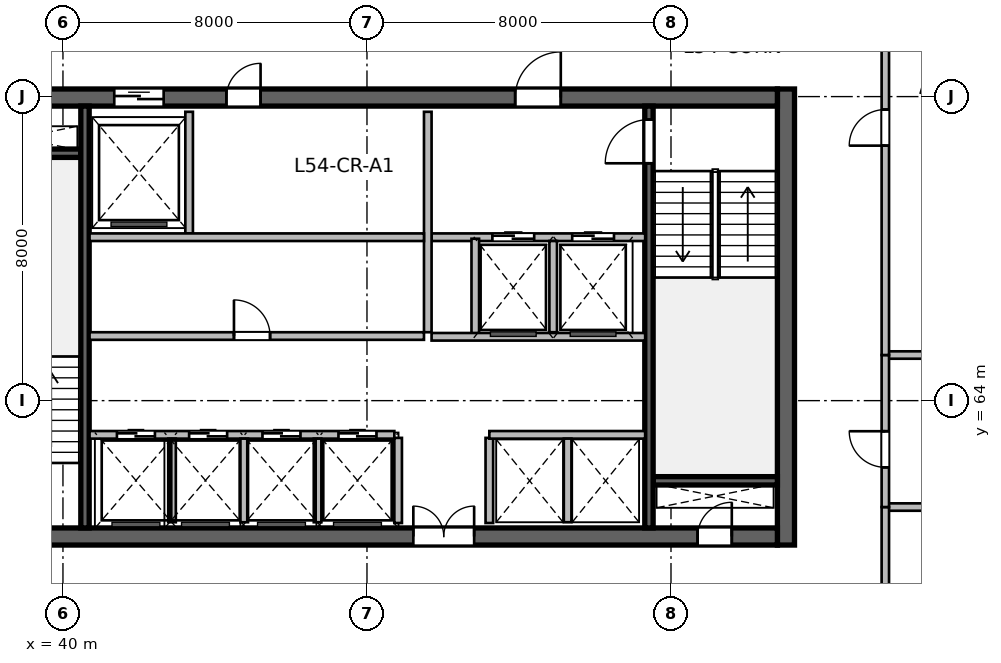
"""IFC4 building model, lengths in metres.
Left out: names, types, materials, properties, quantities, classifications, styles, units other than length and angle.
Written with IfcOpenShell. Run it as: python <this file> out.ifc"""

import sys

from ifc_helpers import new_model, si_unit, direction, frame, frame_2d, origin, place, context, subcontext, project, spatial, rectangle, extrude, source, transform, mapped, element, fill, save


model = new_model("IFC4")
c1 = context("Model", 3, precision=1e-05, world=origin(), true_north=direction((0.0, 1.0)))
c2 = subcontext(c1, "Body", "Model", "MODEL_VIEW")
j1 = project(units=[si_unit("LENGTHUNIT", "METRE"), si_unit("PLANEANGLEUNIT", "RADIAN")], contexts=[c1])
p1 = place(None, origin())
s1 = spatial("IfcSite", under=j1, at=p1, CompositionType="ELEMENT")
p2 = place(p1, origin())
s2 = spatial("IfcBuilding", under=s1, at=p2, CompositionType="ELEMENT")
p3 = place(p2, frame((0.0, 0.0, 223.5)))
s3 = spatial("IfcBuildingStorey", under=s2, at=p3, CompositionType="ELEMENT", Elevation=223.5)
m1 = source(origin(), c2, "Body", "SweptSolid", [
    extrude(rectangle(XDim=12.0, YDim=0.45, at=frame_2d((6.0, 0.0))), origin(), (0.0, 0.0, 1.0), 3.9),
])
p4 = place(p3, frame((59.025, 60.2, 0.0), z_axis=(0.0, 0.0, 1.0), x_axis=(0.0, 1.0, 0.0)))
e1 = element("IfcWall", 1, at=p4, inside=s3, PredefinedType="SHEAR", context=c2, shape_type="MappedRepresentation", body=[
    mapped(m1, transform((0.0, 0.0, 0.0), scale=1.0)),
])
m2 = source(origin(), c2, "Body", "SweptSolid", [
    extrude(rectangle(XDim=21.6, YDim=0.45, at=frame_2d((10.8, 0.0))), origin(), (0.0, 0.0, 1.0), 3.9),
])
p5 = place(p3, frame((37.2, 60.425, 0.0), z_axis=(0.0, 0.0, 1.0), x_axis=(1.0, 0.0, 0.0)))
e2 = element("IfcWall", 2, at=p5, inside=s3, PredefinedType="SHEAR", context=c2, shape_type="MappedRepresentation", body=[
    mapped(m2, transform((0.0, 0.0, 0.0), scale=1.0)),
])
p6 = place(p5, frame((1.1, 0.0, 0.0)))
e3 = element("IfcOpeningElement", 3, at=p6, cuts=e2, PredefinedType="OPENING", context=c2, shape_type="SweptSolid", body=[
    extrude(rectangle(XDim=1.15, YDim=2.15, at=frame_2d((0.575, 1.075))), frame((0.0, 0.235, 0.0), z_axis=(0.0, -1.0, 0.0), x_axis=(1.0, 0.0, 0.0)), (0.0, 0.0, 1.0), 0.47),
])
p7 = place(p5, frame((19.5, 0.0, 0.0)))
e4 = element("IfcOpeningElement", 4, at=p7, cuts=e2, PredefinedType="OPENING", context=c2, shape_type="SweptSolid", body=[
    extrude(rectangle(XDim=0.9, YDim=2.1, at=frame_2d((0.45, 1.05))), frame((0.0, 0.235, 0.0), z_axis=(0.0, -1.0, 0.0), x_axis=(1.0, 0.0, 0.0)), (0.0, 0.0, 1.0), 0.47),
])
p8 = place(p5, frame((12.02, 0.0, 0.0)))
e5 = element("IfcOpeningElement", 5, at=p8, cuts=e2, PredefinedType="OPENING", context=c2, shape_type="SweptSolid", body=[
    extrude(rectangle(XDim=1.6, YDim=2.15, at=frame_2d((0.8, 1.075))), frame((0.0, 0.235, 0.0), z_axis=(0.0, -1.0, 0.0), x_axis=(1.0, 0.0, 0.0)), (0.0, 0.0, 1.0), 0.47),
])
p9 = place(p3, frame((37.2, 71.975, 0.0), z_axis=(0.0, 0.0, 1.0), x_axis=(1.0, 0.0, 0.0)))
e6 = element("IfcWall", 6, at=p9, inside=s3, PredefinedType="SHEAR", context=c2, shape_type="MappedRepresentation", body=[
    mapped(m2, transform((0.0, 0.0, 0.0), scale=1.0)),
])
p10 = place(p9, frame((1.2, 0.0, 0.0)))
e7 = element("IfcOpeningElement", 7, at=p10, cuts=e6, PredefinedType="OPENING", context=c2, shape_type="SweptSolid", body=[
    extrude(rectangle(XDim=0.9, YDim=2.1, at=frame_2d((0.45, 1.05))), frame((0.0, 0.235, 0.0), z_axis=(0.0, -1.0, 0.0), x_axis=(1.0, 0.0, 0.0)), (0.0, 0.0, 1.0), 0.47),
])
p11 = place(p9, frame((14.7, 0.0, 0.0)))
e8 = element("IfcOpeningElement", 8, at=p11, cuts=e6, PredefinedType="OPENING", context=c2, shape_type="SweptSolid", body=[
    extrude(rectangle(XDim=1.2, YDim=2.15, at=frame_2d((0.6, 1.075))), frame((0.0, 0.235, 0.0), z_axis=(0.0, -1.0, 0.0), x_axis=(1.0, 0.0, 0.0)), (0.0, 0.0, 1.0), 0.47),
])
p12 = place(p9, frame((4.15, 0.0, 0.0)))
e9 = element("IfcOpeningElement", 9, at=p12, cuts=e6, PredefinedType="OPENING", context=c2, shape_type="SweptSolid", body=[
    extrude(rectangle(XDim=1.3, YDim=2.15, at=frame_2d((0.65, 1.075))), frame((0.0, 0.235, 0.0), z_axis=(0.0, -1.0, 0.0), x_axis=(1.0, 0.0, 0.0)), (0.0, 0.0, 1.0), 0.47),
])
p13 = place(p9, frame((7.1, 0.0, 0.0)))
e10 = element("IfcOpeningElement", 10, at=p13, cuts=e6, PredefinedType="OPENING", context=c2, shape_type="SweptSolid", body=[
    extrude(rectangle(XDim=0.9, YDim=2.1, at=frame_2d((0.45, 1.05))), frame((0.0, 0.235, 0.0), z_axis=(0.0, -1.0, 0.0), x_axis=(1.0, 0.0, 0.0)), (0.0, 0.0, 1.0), 0.47),
])
m3 = source(origin(), c2, "Body", "SweptSolid", [
    extrude(rectangle(XDim=3.27, YDim=0.22, at=frame_2d((1.635, 0.0))), origin(), (0.0, 0.0, 1.0), 3.9),
])
for number, where, z_axis, x_axis in (
    (11, (37.2, 70.51, 0.0), (0.0, 0.0, 1.0), (1.0, 0.0, 0.0)),
    (12, (55.53, 61.89, 0.0), (0.0, 0.0, 1.0), (1.0, 0.0, 0.0)),
):
    element("IfcWall", number, at=place(p3, frame(where, z_axis=z_axis, x_axis=x_axis)), inside=s3, PredefinedType="SHEAR", context=c2, shape_type="MappedRepresentation", body=[
        mapped(m3, transform((0.0, 0.0, 0.0), scale=1.0)),
    ])
m4 = source(origin(), c2, "Body", "SweptSolid", [
    extrude(rectangle(XDim=11.1, YDim=0.22, at=frame_2d((5.55, 0.0))), origin(), (0.0, 0.0, 1.0), 3.9),
])
p14 = place(p3, frame((40.58, 60.65, 0.0), z_axis=(0.0, 0.0, 1.0), x_axis=(0.0, 1.0, 0.0)))
e13 = element("IfcWall", 13, at=p14, inside=s3, PredefinedType="SHEAR", context=c2, shape_type="MappedRepresentation", body=[
    mapped(m4, transform((0.0, 0.0, 0.0), scale=1.0)),
])
p15 = place(p3, frame((55.42, 60.65, 0.0), z_axis=(0.0, 0.0, 1.0), x_axis=(0.0, 1.0, 0.0)))
e14 = element("IfcWall", 14, at=p15, inside=s3, PredefinedType="SHEAR", context=c2, shape_type="MappedRepresentation", body=[
    mapped(m4, transform((0.0, 0.0, 0.0), scale=1.0)),
])
p16 = place(p15, frame((9.595, 0.0, 0.0)))
e15 = element("IfcOpeningElement", 15, at=p16, cuts=e14, PredefinedType="OPENING", context=c2, shape_type="SweptSolid", body=[
    extrude(rectangle(XDim=1.15, YDim=2.15, at=frame_2d((0.575, 1.075))), frame((0.0, 0.12, 0.0), z_axis=(0.0, -1.0, 0.0), x_axis=(1.0, 0.0, 0.0)), (0.0, 0.0, 1.0), 0.24),
])
m5 = source(origin(), c2, "Body", "SweptSolid", [
    extrude(rectangle(XDim=2.24, YDim=0.2, at=frame_2d((1.12, 0.0))), origin(), (0.0, 0.0, 1.0), 3.64),
])
for number, where, z_axis, x_axis in (
    (16, (48.82, 60.78, 0.0), (0.0, 0.0, 1.0), (0.0, 1.0, 0.0)),
    (17, (51.22, 60.78, 0.0), (0.0, 0.0, 1.0), (0.0, 1.0, 0.0)),
):
    element("IfcWall", number, at=place(p3, frame(where, z_axis=z_axis, x_axis=x_axis)), inside=s3, PredefinedType="SOLIDWALL", context=c2, shape_type="MappedRepresentation", body=[
        mapped(m5, transform((0.0, 0.0, 0.0), scale=1.0)),
    ])
m6 = source(origin(), c2, "Body", "SweptSolid", [
    extrude(rectangle(XDim=5.62, YDim=0.2, at=frame_2d((2.81, 0.0))), origin(), (0.0, 0.0, 1.0), 3.64),
])
p17 = place(p3, frame((49.7, 68.3, 0.0), z_axis=(0.0, 0.0, 1.0), x_axis=(1.0, 0.0, 0.0)))
e18 = element("IfcWall", 18, at=p17, inside=s3, PredefinedType="SOLIDWALL", context=c2, shape_type="MappedRepresentation", body=[
    mapped(m6, transform((0.0, 0.0, 0.0), scale=1.0)),
])
p18 = place(p17, frame((1.6, 0.0, 0.0)))
e19 = element("IfcOpeningElement", 19, at=p18, cuts=e18, PredefinedType="OPENING", context=c2, shape_type="SweptSolid", body=[
    extrude(rectangle(XDim=1.1, YDim=2.15, at=frame_2d((0.55, 1.075))), frame((0.0, 0.11, 0.0), z_axis=(0.0, -1.0, 0.0), x_axis=(1.0, 0.0, 0.0)), (0.0, 0.0, 1.0), 0.22),
])
p19 = place(p17, frame((3.7, 0.0, 0.0)))
e20 = element("IfcOpeningElement", 20, at=p19, cuts=e18, PredefinedType="OPENING", context=c2, shape_type="SweptSolid", body=[
    extrude(rectangle(XDim=1.1, YDim=2.15, at=frame_2d((0.55, 1.075))), frame((0.0, 0.11, 0.0), z_axis=(0.0, -1.0, 0.0), x_axis=(1.0, 0.0, 0.0)), (0.0, 0.0, 1.0), 0.22),
])
m7 = source(origin(), c2, "Body", "SweptSolid", [
    extrude(rectangle(XDim=5.8, YDim=0.2, at=frame_2d((2.9, 0.0))), origin(), (0.0, 0.0, 1.0), 3.64),
])
p20 = place(p3, frame((49.6, 65.8, 0.0), z_axis=(0.0, 0.0, 1.0), x_axis=(0.0, 1.0, 0.0)))
e21 = element("IfcWall", 21, at=p20, inside=s3, PredefinedType="SOLIDWALL", context=c2, shape_type="MappedRepresentation", body=[
    mapped(m7, transform((0.0, 0.0, 0.0), scale=1.0)),
])
m8 = source(origin(), c2, "Body", "SweptSolid", [
    extrude(rectangle(XDim=2.58, YDim=0.2, at=frame_2d((1.29, 0.0))), origin(), (0.0, 0.0, 1.0), 3.64),
])
p21 = place(p3, frame((50.85, 65.68, 0.0), z_axis=(0.0, 0.0, 1.0), x_axis=(0.0, 1.0, 0.0)))
e22 = element("IfcWall", 22, at=p21, inside=s3, PredefinedType="SOLIDWALL", context=c2, shape_type="MappedRepresentation", body=[
    mapped(m8, transform((0.0, 0.0, 0.0), scale=1.0)),
])
m9 = source(origin(), c2, "Body", "SweptSolid", [
    extrude(rectangle(XDim=2.4, YDim=0.2, at=frame_2d((1.2, 0.0))), origin(), (0.0, 0.0, 1.0), 3.64),
])
p22 = place(p3, frame((52.9, 65.8, 0.0), z_axis=(0.0, 0.0, 1.0), x_axis=(0.0, 1.0, 0.0)))
e23 = element("IfcWall", 23, at=p22, inside=s3, PredefinedType="SOLIDWALL", context=c2, shape_type="MappedRepresentation", body=[
    mapped(m9, transform((0.0, 0.0, 0.0), scale=1.0)),
])
p23 = place(p3, frame((49.7, 65.68, 0.0), z_axis=(0.0, 0.0, 1.0), x_axis=(1.0, 0.0, 0.0)))
e24 = element("IfcWall", 24, at=p23, inside=s3, PredefinedType="SOLIDWALL", context=c2, shape_type="MappedRepresentation", body=[
    mapped(m6, transform((0.0, 0.0, 0.0), scale=1.0)),
])
m10 = source(origin(), c2, "Body", "SweptSolid", [
    extrude(rectangle(XDim=3.2, YDim=0.2, at=frame_2d((1.6, 0.0))), origin(), (0.0, 0.0, 1.0), 3.64),
])
p24 = place(p3, frame((43.32, 68.4, 0.0), z_axis=(0.0, 0.0, 1.0), x_axis=(0.0, 1.0, 0.0)))
e25 = element("IfcWall", 25, at=p24, inside=s3, PredefinedType="SOLIDWALL", context=c2, shape_type="MappedRepresentation", body=[
    mapped(m10, transform((0.0, 0.0, 0.0), scale=1.0)),
])
m11 = source(origin(), c2, "Body", "SweptSolid", [
    extrude(rectangle(XDim=8.8, YDim=0.2, at=frame_2d((4.4, 0.0))), origin(), (0.0, 0.0, 1.0), 3.64),
])
p25 = place(p3, frame((40.7, 68.3, 0.0), z_axis=(0.0, 0.0, 1.0), x_axis=(1.0, 0.0, 0.0)))
e26 = element("IfcWall", 26, at=p25, inside=s3, PredefinedType="SOLIDWALL", context=c2, shape_type="MappedRepresentation", body=[
    mapped(m11, transform((0.0, 0.0, 0.0), scale=1.0)),
])
m12 = source(origin(), c2, "Body", "SweptSolid", [
    extrude(rectangle(XDim=8.02, YDim=0.2, at=frame_2d((4.01, 0.0))), origin(), (0.0, 0.0, 1.0), 3.64),
])
p26 = place(p3, frame((40.7, 63.1, 0.0), z_axis=(0.0, 0.0, 1.0), x_axis=(1.0, 0.0, 0.0)))
e27 = element("IfcWall", 27, at=p26, inside=s3, PredefinedType="SOLIDWALL", context=c2, shape_type="MappedRepresentation", body=[
    mapped(m12, transform((0.0, 0.0, 0.0), scale=1.0)),
])
p27 = place(p26, frame((0.72, 0.0, 0.0)))
e28 = element("IfcOpeningElement", 28, at=p27, cuts=e27, PredefinedType="OPENING", context=c2, shape_type="SweptSolid", body=[
    extrude(rectangle(XDim=1.0, YDim=2.15, at=frame_2d((0.5, 1.075))), frame((0.0, 0.11, 0.0), z_axis=(0.0, -1.0, 0.0), x_axis=(1.0, 0.0, 0.0)), (0.0, 0.0, 1.0), 0.22),
])
p28 = place(p26, frame((2.62, 0.0, 0.0)))
e29 = element("IfcOpeningElement", 29, at=p28, cuts=e27, PredefinedType="OPENING", context=c2, shape_type="SweptSolid", body=[
    extrude(rectangle(XDim=1.0, YDim=2.15, at=frame_2d((0.5, 1.075))), frame((0.0, 0.11, 0.0), z_axis=(0.0, -1.0, 0.0), x_axis=(1.0, 0.0, 0.0)), (0.0, 0.0, 1.0), 0.22),
])
p29 = place(p26, frame((4.55, 0.0, 0.0)))
e30 = element("IfcOpeningElement", 30, at=p29, cuts=e27, PredefinedType="OPENING", context=c2, shape_type="SweptSolid", body=[
    extrude(rectangle(XDim=1.0, YDim=2.15, at=frame_2d((0.5, 1.075))), frame((0.0, 0.11, 0.0), z_axis=(0.0, -1.0, 0.0), x_axis=(1.0, 0.0, 0.0)), (0.0, 0.0, 1.0), 0.22),
])
p30 = place(p26, frame((6.55, 0.0, 0.0)))
e31 = element("IfcOpeningElement", 31, at=p30, cuts=e27, PredefinedType="OPENING", context=c2, shape_type="SweptSolid", body=[
    extrude(rectangle(XDim=1.0, YDim=2.15, at=frame_2d((0.5, 1.075))), frame((0.0, 0.11, 0.0), z_axis=(0.0, -1.0, 0.0), x_axis=(1.0, 0.0, 0.0)), (0.0, 0.0, 1.0), 0.22),
])
m13 = source(origin(), c2, "Body", "SweptSolid", [
    extrude(rectangle(XDim=4.1, YDim=0.2, at=frame_2d((2.05, 0.0))), origin(), (0.0, 0.0, 1.0), 3.64),
])
p31 = place(p3, frame((51.22, 63.1, 0.0), z_axis=(0.0, 0.0, 1.0), x_axis=(1.0, 0.0, 0.0)))
e32 = element("IfcWall", 32, at=p31, inside=s3, PredefinedType="SOLIDWALL", context=c2, shape_type="MappedRepresentation", body=[
    mapped(m13, transform((0.0, 0.0, 0.0), scale=1.0)),
])
m14 = source(origin(), c2, "Body", "SweptSolid", [
    extrude(rectangle(XDim=2.2, YDim=0.2, at=frame_2d((1.1, 0.0))), origin(), (0.0, 0.0, 1.0), 3.64),
])
for number, where, z_axis, x_axis in (
    (33, (42.87, 60.8, 0.0), (0.0, 0.0, 1.0), (0.0, 1.0, 0.0)),
    (34, (44.77, 60.8, 0.0), (0.0, 0.0, 1.0), (0.0, 1.0, 0.0)),
    (35, (46.7, 60.8, 0.0), (0.0, 0.0, 1.0), (0.0, 1.0, 0.0)),
    (36, (53.28, 60.8, 0.0), (0.0, 0.0, 1.0), (0.0, 1.0, 0.0)),
):
    element("IfcWall", number, at=place(p3, frame(where, z_axis=z_axis, x_axis=x_axis)), inside=s3, PredefinedType="SOLIDWALL", context=c2, shape_type="MappedRepresentation", body=[
        mapped(m14, transform((0.0, 0.0, 0.0), scale=1.0)),
    ])
p32 = place(p3, frame((40.7, 65.7, 0.0), z_axis=(0.0, 0.0, 1.0), x_axis=(1.0, 0.0, 0.0)))
e37 = element("IfcWall", 37, at=p32, inside=s3, PredefinedType="SOLIDWALL", context=c2, shape_type="MappedRepresentation", body=[
    mapped(m11, transform((0.0, 0.0, 0.0), scale=1.0)),
])
p33 = place(p32, frame((3.8, 0.0, 0.0)))
e38 = element("IfcOpeningElement", 38, at=p33, cuts=e37, PredefinedType="OPENING", context=c2, shape_type="SweptSolid", body=[
    extrude(rectangle(XDim=0.95, YDim=2.15, at=frame_2d((0.475, 1.075))), frame((0.0, 0.11, 0.0), z_axis=(0.0, -1.0, 0.0), x_axis=(1.0, 0.0, 0.0)), (0.0, 0.0, 1.0), 0.22),
])
m15 = source(origin(), c2, "Body", "SweptSolid", [
    extrude(rectangle(XDim=18.342, YDim=0.195, at=frame_2d((9.171, 0.0))), origin(), (0.0, 0.0, 1.0), 3.64),
])
p34 = place(p3, frame((61.64, 61.2, 0.0), z_axis=(0.0, 0.0, 1.0), x_axis=(1.0, 0.0, 0.0)))
e39 = element("IfcWall", 39, at=p34, inside=s3, PredefinedType="PARTITIONING", context=c2, shape_type="MappedRepresentation", body=[
    mapped(m15, transform((0.0, 0.0, 0.0), scale=1.0)),
])
m16 = source(origin(), c2, "Body", "SweptSolid", [
    extrude(rectangle(XDim=3.24, YDim=0.195, at=frame_2d((1.62, 0.0))), origin(), (0.0, 0.0, 1.0), 3.64),
])
p35 = place(p3, frame((61.64, 57.96, 0.0), z_axis=(0.0, 0.0, 1.0), x_axis=(0.0, 1.0, 0.0)))
e40 = element("IfcWall", 40, at=p35, inside=s3, PredefinedType="PARTITIONING", context=c2, shape_type="MappedRepresentation", body=[
    mapped(m16, transform((0.0, 0.0, 0.0), scale=1.0)),
])
m17 = source(origin(), c2, "Body", "SweptSolid", [
    extrude(rectangle(XDim=15.332, YDim=0.195, at=frame_2d((7.666, 0.0))), origin(), (0.0, 0.0, 1.0), 3.64),
])
p36 = place(p3, frame((61.64, 65.2, 0.0), z_axis=(0.0, 0.0, 1.0), x_axis=(1.0, 0.0, 0.0)))
e41 = element("IfcWall", 41, at=p36, inside=s3, PredefinedType="PARTITIONING", context=c2, shape_type="MappedRepresentation", body=[
    mapped(m17, transform((0.0, 0.0, 0.0), scale=1.0)),
])
m18 = source(origin(), c2, "Body", "SweptSolid", [
    extrude(rectangle(XDim=4.0, YDim=0.195, at=frame_2d((2.0, 0.0))), origin(), (0.0, 0.0, 1.0), 3.64),
])
p37 = place(p3, frame((61.64, 61.2, 0.0), z_axis=(0.0, 0.0, 1.0), x_axis=(0.0, 1.0, 0.0)))
e42 = element("IfcWall", 42, at=p37, inside=s3, PredefinedType="PARTITIONING", context=c2, shape_type="MappedRepresentation", body=[
    mapped(m18, transform((0.0, 0.0, 0.0), scale=1.0)),
])
p38 = place(p37, frame((1.045, 0.0, 0.0)))
e43 = element("IfcOpeningElement", 43, at=p38, cuts=e42, PredefinedType="OPENING", context=c2, shape_type="SweptSolid", body=[
    extrude(rectangle(XDim=0.95, YDim=2.1, at=frame_2d((0.475, 1.05))), frame((0.0, 0.107, 0.0), z_axis=(0.0, -1.0, 0.0), x_axis=(1.0, 0.0, 0.0)), (0.0, 0.0, 1.0), 0.215),
])
m19 = source(origin(), c2, "Body", "SweptSolid", [
    extrude(rectangle(XDim=11.969, YDim=0.195, at=frame_2d((5.984, 0.0))), origin(), (0.0, 0.0, 1.0), 3.64),
])
p39 = place(p3, frame((61.64, 65.2, 0.0), z_axis=(0.0, 0.0, 1.0), x_axis=(0.0, 1.0, 0.0)))
e44 = element("IfcWall", 44, at=p39, inside=s3, PredefinedType="PARTITIONING", context=c2, shape_type="MappedRepresentation", body=[
    mapped(m19, transform((0.0, 0.0, 0.0), scale=1.0)),
])
p40 = place(p39, frame((5.51, 0.0, 0.0)))
e45 = element("IfcOpeningElement", 45, at=p40, cuts=e44, PredefinedType="OPENING", context=c2, shape_type="SweptSolid", body=[
    extrude(rectangle(XDim=0.95, YDim=2.1, at=frame_2d((0.475, 1.05))), frame((0.0, 0.107, 0.0), z_axis=(0.0, -1.0, 0.0), x_axis=(1.0, 0.0, 0.0)), (0.0, 0.0, 1.0), 0.215),
])
m20 = source(origin(), c2, "Body", "SweptSolid", [
    extrude(rectangle(XDim=0.9, YDim=2.1, at=frame_2d((0.45, 1.05))), frame((0.0, 0.025, 0.0), z_axis=(0.0, -1.0, 0.0), x_axis=(1.0, 0.0, 0.0)), (0.0, 0.0, 1.0), 0.05),
])
p41 = place(p7, origin())
e46 = element("IfcDoor", 46, at=p41, inside=s3, OperationType="SINGLE_SWING_RIGHT", PredefinedType="DOOR", context=c2, shape_type="MappedRepresentation", body=[
    mapped(m20, transform((0.0, 0.0, 0.0), scale=1.0)),
])
fill(e4, e46)
m21 = source(origin(), c2, "Body", "SweptSolid", [
    extrude(rectangle(XDim=1.15, YDim=2.15, at=frame_2d((0.575, 1.075))), frame((0.0, 0.025, 0.0), z_axis=(0.0, -1.0, 0.0), x_axis=(1.0, 0.0, 0.0)), (0.0, 0.0, 1.0), 0.05),
])
p42 = place(p16, origin())
e47 = element("IfcDoor", 47, at=p42, inside=s3, OperationType="SINGLE_SWING_LEFT", PredefinedType="DOOR", context=c2, shape_type="MappedRepresentation", body=[
    mapped(m21, transform((0.0, 0.0, 0.0), scale=1.0)),
])
fill(e15, e47)
m22 = source(origin(), c2, "Body", "SweptSolid", [
    extrude(rectangle(XDim=1.6, YDim=2.15, at=frame_2d((0.8, 1.075))), frame((0.0, 0.025, 0.0), z_axis=(0.0, -1.0, 0.0), x_axis=(1.0, 0.0, 0.0)), (0.0, 0.0, 1.0), 0.05),
])
p43 = place(p8, origin())
e48 = element("IfcDoor", 48, at=p43, inside=s3, OperationType="DOUBLE_DOOR_SINGLE_SWING", PredefinedType="DOOR", context=c2, shape_type="MappedRepresentation", body=[
    mapped(m22, transform((0.0, 0.0, 0.0), scale=1.0)),
])
fill(e5, e48)
m23 = source(origin(), c2, "Body", "SweptSolid", [
    extrude(rectangle(XDim=1.2, YDim=2.15, at=frame_2d((0.6, 1.075))), frame((0.0, 0.025, 0.0), z_axis=(0.0, -1.0, 0.0), x_axis=(1.0, 0.0, 0.0)), (0.0, 0.0, 1.0), 0.05),
])
p44 = place(p11, origin())
e49 = element("IfcDoor", 49, at=p44, inside=s3, OperationType="SINGLE_SWING_RIGHT", PredefinedType="DOOR", context=c2, shape_type="MappedRepresentation", body=[
    mapped(m23, transform((0.0, 0.0, 0.0), scale=1.0)),
])
fill(e8, e49)
m24 = source(origin(), c2, "Body", "SweptSolid", [
    extrude(rectangle(XDim=1.1, YDim=2.15, at=frame_2d((0.55, 1.075))), frame((0.0, 0.025, 0.0), z_axis=(0.0, -1.0, 0.0), x_axis=(1.0, 0.0, 0.0)), (0.0, 0.0, 1.0), 0.05),
])
p45 = place(p18, origin())
e50 = element("IfcDoor", 50, at=p45, inside=s3, OperationType="DOUBLE_DOOR_SLIDING", PredefinedType="DOOR", context=c2, shape_type="MappedRepresentation", body=[
    mapped(m24, transform((0.0, 0.0, 0.0), scale=1.0)),
])
fill(e19, e50)
p46 = place(p19, origin())
e51 = element("IfcDoor", 51, at=p46, inside=s3, OperationType="DOUBLE_DOOR_SLIDING", PredefinedType="DOOR", context=c2, shape_type="MappedRepresentation", body=[
    mapped(m24, transform((0.0, 0.0, 0.0), scale=1.0)),
])
fill(e20, e51)
m25 = source(origin(), c2, "Body", "SweptSolid", [
    extrude(rectangle(XDim=1.3, YDim=2.15, at=frame_2d((0.65, 1.075))), frame((0.0, 0.025, 0.0), z_axis=(0.0, -1.0, 0.0), x_axis=(1.0, 0.0, 0.0)), (0.0, 0.0, 1.0), 0.05),
])
p47 = place(p12, origin())
e52 = element("IfcDoor", 52, at=p47, inside=s3, OperationType="DOUBLE_DOOR_SLIDING", PredefinedType="DOOR", context=c2, shape_type="MappedRepresentation", body=[
    mapped(m25, transform((0.0, 0.0, 0.0), scale=1.0)),
])
fill(e9, e52)
p48 = place(p13, origin())
e53 = element("IfcDoor", 53, at=p48, inside=s3, OperationType="SINGLE_SWING_RIGHT", PredefinedType="DOOR", context=c2, shape_type="MappedRepresentation", body=[
    mapped(m20, transform((0.0, 0.0, 0.0), scale=1.0)),
])
fill(e10, e53)
m26 = source(origin(), c2, "Body", "SweptSolid", [
    extrude(rectangle(XDim=1.0, YDim=2.15, at=frame_2d((0.5, 1.075))), frame((0.0, 0.025, 0.0), z_axis=(0.0, -1.0, 0.0), x_axis=(1.0, 0.0, 0.0)), (0.0, 0.0, 1.0), 0.05),
])
p49 = place(p27, origin())
e54 = element("IfcDoor", 54, at=p49, inside=s3, OperationType="DOUBLE_DOOR_SLIDING", PredefinedType="DOOR", context=c2, shape_type="MappedRepresentation", body=[
    mapped(m26, transform((0.0, 0.0, 0.0), scale=1.0)),
])
fill(e28, e54)
p50 = place(p28, origin())
e55 = element("IfcDoor", 55, at=p50, inside=s3, OperationType="DOUBLE_DOOR_SLIDING", PredefinedType="DOOR", context=c2, shape_type="MappedRepresentation", body=[
    mapped(m26, transform((0.0, 0.0, 0.0), scale=1.0)),
])
fill(e29, e55)
p51 = place(p29, origin())
e56 = element("IfcDoor", 56, at=p51, inside=s3, OperationType="DOUBLE_DOOR_SLIDING", PredefinedType="DOOR", context=c2, shape_type="MappedRepresentation", body=[
    mapped(m26, transform((0.0, 0.0, 0.0), scale=1.0)),
])
fill(e30, e56)
p52 = place(p30, origin())
e57 = element("IfcDoor", 57, at=p52, inside=s3, OperationType="DOUBLE_DOOR_SLIDING", PredefinedType="DOOR", context=c2, shape_type="MappedRepresentation", body=[
    mapped(m26, transform((0.0, 0.0, 0.0), scale=1.0)),
])
fill(e31, e57)
m27 = source(origin(), c2, "Body", "SweptSolid", [
    extrude(rectangle(XDim=0.95, YDim=2.15, at=frame_2d((0.475, 1.075))), frame((0.0, 0.025, 0.0), z_axis=(0.0, -1.0, 0.0), x_axis=(1.0, 0.0, 0.0)), (0.0, 0.0, 1.0), 0.05),
])
p53 = place(p33, origin())
e58 = element("IfcDoor", 58, at=p53, inside=s3, OperationType="SINGLE_SWING_LEFT", PredefinedType="DOOR", context=c2, shape_type="MappedRepresentation", body=[
    mapped(m27, transform((0.0, 0.0, 0.0), scale=1.0)),
])
fill(e38, e58)
m28 = source(origin(), c2, "Body", "SweptSolid", [
    extrude(rectangle(XDim=0.95, YDim=2.1, at=frame_2d((0.475, 1.05))), frame((0.0, 0.025, 0.0), z_axis=(0.0, -1.0, 0.0), x_axis=(1.0, 0.0, 0.0)), (0.0, 0.0, 1.0), 0.05),
])
p54 = place(p38, origin())
e59 = element("IfcDoor", 59, at=p54, inside=s3, OperationType="SINGLE_SWING_RIGHT", PredefinedType="DOOR", context=c2, shape_type="MappedRepresentation", body=[
    mapped(m28, transform((0.0, 0.0, 0.0), scale=1.0)),
])
fill(e43, e59)
p55 = place(p40, origin())
e60 = element("IfcDoor", 60, at=p55, inside=s3, OperationType="SINGLE_SWING_LEFT", PredefinedType="DOOR", context=c2, shape_type="MappedRepresentation", body=[
    mapped(m28, transform((0.0, 0.0, 0.0), scale=1.0)),
])
fill(e45, e60)
save(model, sys.argv[1])
